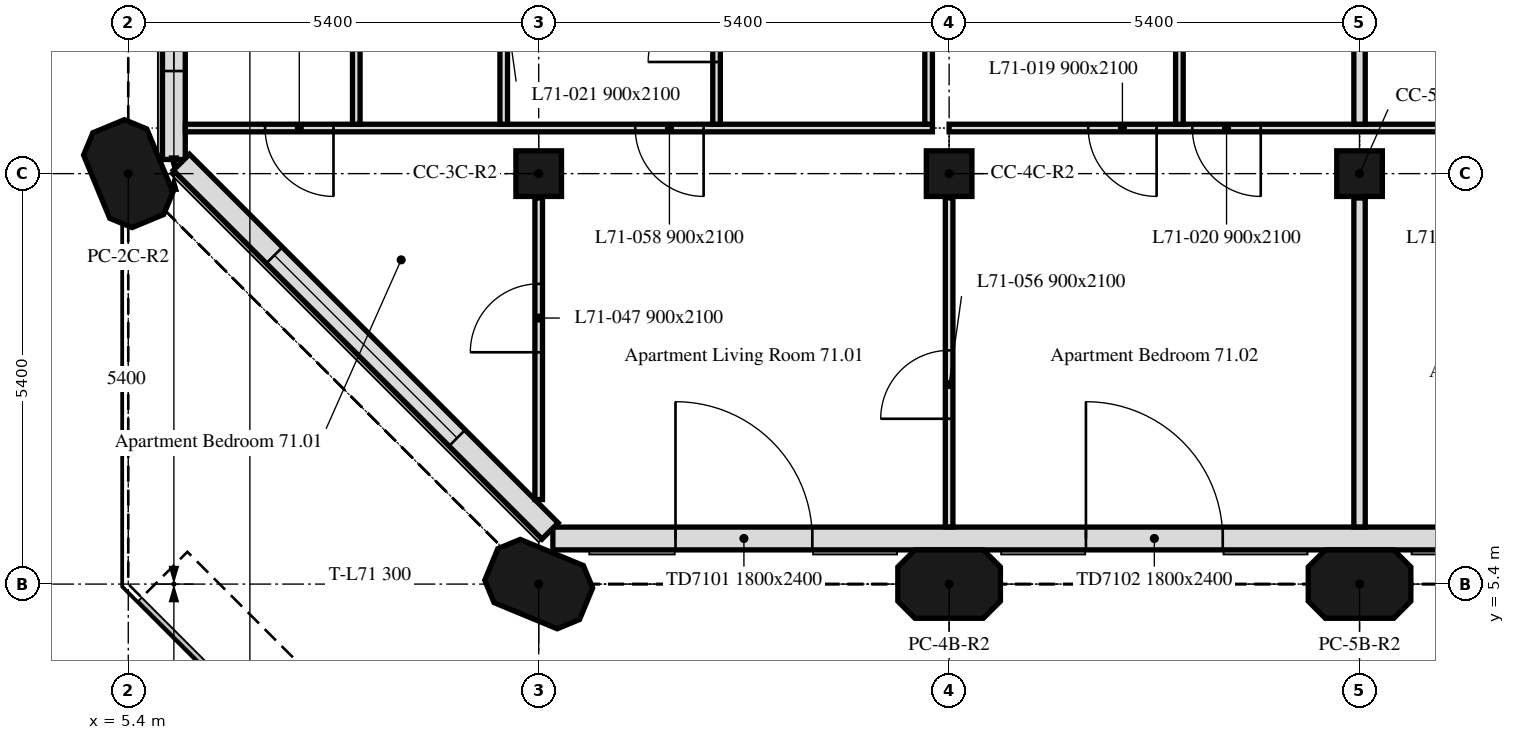
"""IFC4 building model, lengths in metres.
Left out: names, types, materials, properties, quantities, classifications, styles, units other than length and angle.
Written with IfcOpenShell. Run it as: python <this file> out.ifc"""

import sys

from ifc_helpers import new_model, si_unit, direction, frame, frame_2d, origin, origin_2d, place, context, subcontext, project, spatial, polyline, rectangle, outline, extrude, element, fill, save


model = new_model("IFC4")
c1 = context("Model", 3, precision=1e-05, world=origin(), true_north=direction((0.0, 1.0)))
c2 = subcontext(c1, "Body", "Model", "MODEL_VIEW")
j1 = project(units=[si_unit("LENGTHUNIT", "METRE"), si_unit("PLANEANGLEUNIT", "RADIAN")], contexts=[c1])
p1 = place(None, origin())
s1 = spatial("IfcSite", under=j1, at=p1, CompositionType="ELEMENT")
p2 = place(p1, origin())
s2 = spatial("IfcBuilding", under=s1, at=p2, CompositionType="ELEMENT")
p3 = place(p2, frame((0.0, 0.0, 288.4)))
s3 = spatial("IfcBuildingStorey", under=s2, at=p3, CompositionType="ELEMENT", Elevation=288.4)
for number, where, z_axis, x_axis in (
    (1, (10.8, 5.4, 0.0), (0.0, 0.0, 1.0), (-0.924, 0.383, 0.0)),
    (2, (16.2, 5.4, 0.0), (0.0, 0.0, 1.0), (1.0, 0.0, 0.0)),
    (3, (21.6, 5.4, 0.0), (0.0, 0.0, 1.0), (1.0, 0.0, 0.0)),
    (4, (5.4, 10.8, 0.0), (0.0, 0.0, 1.0), (-0.383, 0.924, 0.0)),
):
    element("IfcColumn", number, at=place(p3, frame(where, z_axis=z_axis, x_axis=x_axis)), inside=s3, PredefinedType="COLUMN", context=c2, shape_type="SweptSolid", body=[
        extrude(outline(polyline([(-0.45, -0.45), (0.45, -0.45), (0.675, -0.225), (0.675, 0.225), (0.45, 0.45), (-0.45, 0.45), (-0.675, 0.225), (-0.675, -0.225), (-0.45, -0.45)])), origin(), (0.0, 0.0, 1.0), 3.0),
    ])
for number, where, z_axis, x_axis in (
    (5, (10.8, 10.8, 0.0), (0.0, 0.0, 1.0), (1.0, 0.0, 0.0)),
    (6, (16.2, 10.8, 0.0), (0.0, 0.0, 1.0), (1.0, 0.0, 0.0)),
    (7, (21.6, 10.8, 0.0), (0.0, 0.0, 1.0), (1.0, 0.0, 0.0)),
):
    element("IfcColumn", number, at=place(p3, frame(where, z_axis=z_axis, x_axis=x_axis)), inside=s3, PredefinedType="COLUMN", context=c2, shape_type="SweptSolid", body=[
        extrude(rectangle(XDim=0.6, YDim=0.6, at=origin_2d()), origin(), (0.0, 0.0, 1.0), 3.0),
    ])
p4 = place(p3, frame((10.986, 6.0, 0.0), z_axis=(0.0, 0.0, 1.0), x_axis=(1.0, 0.0, 0.0)))
e8 = element("IfcWall", 8, at=p4, inside=s3, PredefinedType="SOLIDWALL", context=c2, shape_type="SweptSolid", body=[
    extrude(rectangle(XDim=32.027, YDim=0.3, at=frame_2d((16.014, 0.0))), origin(), (0.0, 0.0, 1.0), 3.0),
])
p5 = place(p4, frame((1.614, 0.0, 0.0)))
e9 = element("IfcOpeningElement", 9, at=p5, cuts=e8, PredefinedType="OPENING", context=c2, shape_type="SweptSolid", body=[
    extrude(rectangle(XDim=1.8, YDim=2.4, at=frame_2d((0.9, 1.2))), frame((0.0, 0.16, 0.0), z_axis=(0.0, -1.0, 0.0), x_axis=(1.0, 0.0, 0.0)), (0.0, 0.0, 1.0), 0.32),
])
p6 = place(p4, frame((7.014, 0.0, 0.0)))
e10 = element("IfcOpeningElement", 10, at=p6, cuts=e8, PredefinedType="OPENING", context=c2, shape_type="SweptSolid", body=[
    extrude(rectangle(XDim=1.8, YDim=2.4, at=frame_2d((0.9, 1.2))), frame((0.0, 0.16, 0.0), z_axis=(0.0, -1.0, 0.0), x_axis=(1.0, 0.0, 0.0)), (0.0, 0.0, 1.0), 0.32),
])
p7 = place(p4, frame((12.414, 0.0, 0.0)))
e11 = element("IfcOpeningElement", 11, at=p7, cuts=e8, PredefinedType="OPENING", context=c2, shape_type="SweptSolid", body=[
    extrude(rectangle(XDim=1.8, YDim=2.4, at=frame_2d((0.9, 1.2))), frame((0.0, 0.16, 0.0), z_axis=(0.0, -1.0, 0.0), x_axis=(1.0, 0.0, 0.0)), (0.0, 0.0, 1.0), 0.32),
])
p8 = place(p4, frame((17.814, 0.0, 0.0)))
e12 = element("IfcOpeningElement", 12, at=p8, cuts=e8, PredefinedType="OPENING", context=c2, shape_type="SweptSolid", body=[
    extrude(rectangle(XDim=1.8, YDim=2.4, at=frame_2d((0.9, 1.2))), frame((0.0, 0.16, 0.0), z_axis=(0.0, -1.0, 0.0), x_axis=(1.0, 0.0, 0.0)), (0.0, 0.0, 1.0), 0.32),
])
p9 = place(p4, frame((23.214, 0.0, 0.0)))
e13 = element("IfcOpeningElement", 13, at=p9, cuts=e8, PredefinedType="OPENING", context=c2, shape_type="SweptSolid", body=[
    extrude(rectangle(XDim=1.8, YDim=2.4, at=frame_2d((0.9, 1.2))), frame((0.0, 0.16, 0.0), z_axis=(0.0, -1.0, 0.0), x_axis=(1.0, 0.0, 0.0)), (0.0, 0.0, 1.0), 0.32),
])
p10 = place(p4, frame((28.614, 0.0, 0.0)))
e14 = element("IfcOpeningElement", 14, at=p10, cuts=e8, PredefinedType="OPENING", context=c2, shape_type="SweptSolid", body=[
    extrude(rectangle(XDim=1.8, YDim=2.4, at=frame_2d((0.9, 1.2))), frame((0.0, 0.16, 0.0), z_axis=(0.0, -1.0, 0.0), x_axis=(1.0, 0.0, 0.0)), (0.0, 0.0, 1.0), 0.32),
])
p11 = place(p3, frame((6.0, 16.2, 0.0), z_axis=(0.0, 0.0, 1.0), x_axis=(0.0, -1.0, 0.0)))
e15 = element("IfcWall", 15, at=p11, inside=s3, PredefinedType="SOLIDWALL", context=c2, shape_type="SweptSolid", body=[
    extrude(rectangle(XDim=5.214, YDim=0.3, at=frame_2d((2.607, 0.0))), origin(), (0.0, 0.0, 1.0), 3.0),
])
p12 = place(p11, frame((1.0, 0.0, 0.9)))
e16 = element("IfcOpeningElement", 16, at=p12, cuts=e15, PredefinedType="OPENING", context=c2, shape_type="SweptSolid", body=[
    extrude(rectangle(XDim=1.1, YDim=1.7, at=frame_2d((0.55, 0.85))), frame((0.0, 0.16, 0.0), z_axis=(0.0, -1.0, 0.0), x_axis=(1.0, 0.0, 0.0)), (0.0, 0.0, 1.0), 0.32),
])
p13 = place(p11, frame((2.95, 0.0, 0.9)))
e17 = element("IfcOpeningElement", 17, at=p13, cuts=e15, PredefinedType="OPENING", context=c2, shape_type="SweptSolid", body=[
    extrude(rectangle(XDim=1.1, YDim=1.7, at=frame_2d((0.55, 0.85))), frame((0.0, 0.16, 0.0), z_axis=(0.0, -1.0, 0.0), x_axis=(1.0, 0.0, 0.0)), (0.0, 0.0, 1.0), 0.32),
])
p14 = place(p3, frame((6.099, 10.949, 0.0), z_axis=(0.0, 0.0, 1.0), x_axis=(0.707106781187, -0.707106781187, 0.0)))
e18 = element("IfcWall", 18, at=p14, inside=s3, PredefinedType="SOLIDWALL", context=c2, shape_type="SweptSolid", body=[
    extrude(rectangle(XDim=6.86, YDim=0.3, at=frame_2d((3.43, 0.0))), origin(), (0.0, 0.0, 1.0), 3.0),
])
p15 = place(p14, frame((1.73, 0.0, 0.9)))
e19 = element("IfcOpeningElement", 19, at=p15, cuts=e18, PredefinedType="OPENING", context=c2, shape_type="SweptSolid", body=[
    extrude(rectangle(XDim=3.4, YDim=1.7, at=frame_2d((1.7, 0.85))), frame((0.0, 0.16, 0.0), z_axis=(0.0, -1.0, 0.0), x_axis=(1.0, 0.0, 0.0)), (0.0, 0.0, 1.0), 0.32),
])
p16 = place(p3, frame((15.98, 11.4, 0.0), z_axis=(0.0, 0.0, 1.0), x_axis=(-1.0, 0.0, 0.0)))
e20 = element("IfcWall", 20, at=p16, inside=s3, PredefinedType="PARTITIONING", context=c2, shape_type="SweptSolid", body=[
    extrude(rectangle(XDim=9.829, YDim=0.1, at=frame_2d((4.915, 0.0))), origin(), (0.0, 0.0, 1.0), 3.0),
])
p17 = place(p16, frame((7.88, 0.0, 0.0)))
e21 = element("IfcOpeningElement", 21, at=p17, cuts=e20, PredefinedType="OPENING", context=c2, shape_type="SweptSolid", body=[
    extrude(rectangle(XDim=0.9, YDim=2.1, at=frame_2d((0.45, 1.05))), frame((0.0, 0.05, 0.0), z_axis=(0.0, -1.0, 0.0), x_axis=(1.0, 0.0, 0.0)), (0.0, 0.0, 1.0), 0.1),
])
p18 = place(p16, frame((3.01, 0.0, 0.0)))
e22 = element("IfcOpeningElement", 22, at=p18, cuts=e20, PredefinedType="OPENING", context=c2, shape_type="SweptSolid", body=[
    extrude(rectangle(XDim=0.9, YDim=2.1, at=frame_2d((0.45, 1.05))), frame((0.0, 0.05, 0.0), z_axis=(0.0, -1.0, 0.0), x_axis=(1.0, 0.0, 0.0)), (0.0, 0.0, 1.0), 0.1),
])
p19 = place(p3, frame((10.8, 6.512, 0.0), z_axis=(0.0, 0.0, 1.0), x_axis=(0.0, 1.0, 0.0)))
e23 = element("IfcWall", 23, at=p19, inside=s3, PredefinedType="PARTITIONING", context=c2, shape_type="SweptSolid", body=[
    extrude(rectangle(XDim=3.968, YDim=0.1, at=frame_2d((1.984, 0.0))), origin(), (0.0, 0.0, 1.0), 3.0),
])
p20 = place(p19, frame((1.938, 0.0, 0.0)))
e24 = element("IfcOpeningElement", 24, at=p20, cuts=e23, PredefinedType="OPENING", context=c2, shape_type="SweptSolid", body=[
    extrude(rectangle(XDim=0.9, YDim=2.1, at=frame_2d((0.45, 1.05))), frame((0.0, 0.05, 0.0), z_axis=(0.0, -1.0, 0.0), x_axis=(1.0, 0.0, 0.0)), (0.0, 0.0, 1.0), 0.1),
])
p21 = place(p3, frame((16.2, 6.151, 0.0), z_axis=(0.0, 0.0, 1.0), x_axis=(0.0, 1.0, 0.0)))
e25 = element("IfcWall", 25, at=p21, inside=s3, PredefinedType="PARTITIONING", context=c2, shape_type="SweptSolid", body=[
    extrude(rectangle(XDim=4.329, YDim=0.1, at=frame_2d((2.165, 0.0))), origin(), (0.0, 0.0, 1.0), 3.0),
])
p22 = place(p21, frame((1.424, 0.0, 0.0)))
e26 = element("IfcOpeningElement", 26, at=p22, cuts=e25, PredefinedType="OPENING", context=c2, shape_type="SweptSolid", body=[
    extrude(rectangle(XDim=0.9, YDim=2.1, at=frame_2d((0.45, 1.05))), frame((0.0, 0.05, 0.0), z_axis=(0.0, -1.0, 0.0), x_axis=(1.0, 0.0, 0.0)), (0.0, 0.0, 1.0), 0.1),
])
p23 = place(p3, frame((37.8, 11.4, 0.0), z_axis=(0.0, 0.0, 1.0), x_axis=(-1.0, 0.0, 0.0)))
e27 = element("IfcWall", 27, at=p23, inside=s3, PredefinedType="PARTITIONING", context=c2, shape_type="SweptSolid", body=[
    extrude(rectangle(XDim=21.6, YDim=0.1, at=frame_2d((10.8, 0.0))), origin(), (0.0, 0.0, 1.0), 3.0),
])
p24 = place(p23, frame((18.87, 0.0, 0.0)))
e28 = element("IfcOpeningElement", 28, at=p24, cuts=e27, PredefinedType="OPENING", context=c2, shape_type="SweptSolid", body=[
    extrude(rectangle(XDim=0.9, YDim=2.1, at=frame_2d((0.45, 1.05))), frame((0.0, 0.05, 0.0), z_axis=(0.0, -1.0, 0.0), x_axis=(1.0, 0.0, 0.0)), (0.0, 0.0, 1.0), 0.1),
])
p25 = place(p23, frame((17.5, 0.0, 0.0)))
e29 = element("IfcOpeningElement", 29, at=p25, cuts=e27, PredefinedType="OPENING", context=c2, shape_type="SweptSolid", body=[
    extrude(rectangle(XDim=0.9, YDim=2.1, at=frame_2d((0.45, 1.05))), frame((0.0, 0.05, 0.0), z_axis=(0.0, -1.0, 0.0), x_axis=(1.0, 0.0, 0.0)), (0.0, 0.0, 1.0), 0.1),
])
p26 = place(p23, frame((6.917, 0.0, 0.0)))
e30 = element("IfcOpeningElement", 30, at=p26, cuts=e27, PredefinedType="OPENING", context=c2, shape_type="SweptSolid", body=[
    extrude(rectangle(XDim=0.9, YDim=2.1, at=frame_2d((0.45, 1.05))), frame((0.0, 0.05, 0.0), z_axis=(0.0, -1.0, 0.0), x_axis=(1.0, 0.0, 0.0)), (0.0, 0.0, 1.0), 0.1),
])
p27 = place(p23, frame((3.15, 0.0, 0.0)))
e31 = element("IfcOpeningElement", 31, at=p27, cuts=e27, PredefinedType="OPENING", context=c2, shape_type="SweptSolid", body=[
    extrude(rectangle(XDim=0.9, YDim=2.1, at=frame_2d((0.45, 1.05))), frame((0.0, 0.05, 0.0), z_axis=(0.0, -1.0, 0.0), x_axis=(1.0, 0.0, 0.0)), (0.0, 0.0, 1.0), 0.1),
])
p28 = place(p23, frame((14.158, 0.0, 0.0)))
e32 = element("IfcOpeningElement", 32, at=p28, cuts=e27, PredefinedType="OPENING", context=c2, shape_type="SweptSolid", body=[
    extrude(rectangle(XDim=0.9, YDim=2.1, at=frame_2d((0.45, 1.05))), frame((0.0, 0.05, 0.0), z_axis=(0.0, -1.0, 0.0), x_axis=(1.0, 0.0, 0.0)), (0.0, 0.0, 1.0), 0.1),
])
p29 = place(p23, frame((12.788, 0.0, 0.0)))
e33 = element("IfcOpeningElement", 33, at=p29, cuts=e27, PredefinedType="OPENING", context=c2, shape_type="SweptSolid", body=[
    extrude(rectangle(XDim=0.9, YDim=2.1, at=frame_2d((0.45, 1.05))), frame((0.0, 0.05, 0.0), z_axis=(0.0, -1.0, 0.0), x_axis=(1.0, 0.0, 0.0)), (0.0, 0.0, 1.0), 0.1),
])
p30 = place(p3, frame((21.6, 6.151, 0.0), z_axis=(0.0, 0.0, 1.0), x_axis=(0.0, 1.0, 0.0)))
e34 = element("IfcWall", 34, at=p30, inside=s3, PredefinedType="PARTITIONING", context=c2, shape_type="SweptSolid", body=[
    extrude(rectangle(XDim=4.329, YDim=0.15, at=frame_2d((2.165, 0.0))), origin(), (0.0, 0.0, 1.0), 3.0),
])
p31 = place(p3, frame((8.4, 11.45, 0.0), z_axis=(0.0, 0.0, 1.0), x_axis=(0.0, 1.0, 0.0)))
e35 = element("IfcWall", 35, at=p31, inside=s3, PredefinedType="PARTITIONING", context=c2, shape_type="SweptSolid", body=[
    extrude(rectangle(XDim=2.425, YDim=0.1, at=frame_2d((1.212, 0.0))), origin(), (0.0, 0.0, 1.0), 3.0),
])
p32 = place(p3, frame((10.34, 11.45, 0.0), z_axis=(0.0, 0.0, 1.0), x_axis=(0.0, 1.0, 0.0)))
e36 = element("IfcWall", 36, at=p32, inside=s3, PredefinedType="PARTITIONING", context=c2, shape_type="SweptSolid", body=[
    extrude(rectangle(XDim=2.425, YDim=0.1, at=frame_2d((1.212, 0.0))), origin(), (0.0, 0.0, 1.0), 3.0),
])
p33 = place(p32, frame((1.275, 0.0, 0.0)))
e37 = element("IfcOpeningElement", 37, at=p33, cuts=e36, PredefinedType="OPENING", context=c2, shape_type="SweptSolid", body=[
    extrude(rectangle(XDim=0.9, YDim=2.1, at=frame_2d((0.45, 1.05))), frame((0.0, 0.05, 0.0), z_axis=(0.0, -1.0, 0.0), x_axis=(1.0, 0.0, 0.0)), (0.0, 0.0, 1.0), 0.1),
])
p34 = place(p3, frame((13.14, 11.45, 0.0), z_axis=(0.0, 0.0, 1.0), x_axis=(0.0, 1.0, 0.0)))
e38 = element("IfcWall", 38, at=p34, inside=s3, PredefinedType="PARTITIONING", context=c2, shape_type="SweptSolid", body=[
    extrude(rectangle(XDim=2.425, YDim=0.1, at=frame_2d((1.212, 0.0))), origin(), (0.0, 0.0, 1.0), 3.0),
])
p35 = place(p34, frame((0.819, 0.0, 0.0)))
e39 = element("IfcOpeningElement", 39, at=p35, cuts=e38, PredefinedType="OPENING", context=c2, shape_type="SweptSolid", body=[
    extrude(rectangle(XDim=0.9, YDim=2.1, at=frame_2d((0.45, 1.05))), frame((0.0, 0.05, 0.0), z_axis=(0.0, -1.0, 0.0), x_axis=(1.0, 0.0, 0.0)), (0.0, 0.0, 1.0), 0.1),
])
for number, where, z_axis, x_axis in (
    (40, (15.93, 11.45, 0.0), (0.0, 0.0, 1.0), (0.0, 1.0, 0.0)),
    (41, (19.23, 11.45, 0.0), (0.0, 0.0, 1.0), (0.0, 1.0, 0.0)),
):
    element("IfcWall", number, at=place(p3, frame(where, z_axis=z_axis, x_axis=x_axis)), inside=s3, PredefinedType="PARTITIONING", context=c2, shape_type="SweptSolid", body=[
        extrude(rectangle(XDim=2.425, YDim=0.1, at=frame_2d((1.212, 0.0))), origin(), (0.0, 0.0, 1.0), 3.0),
    ])
p36 = place(p3, frame((21.6, 11.45, 0.0), z_axis=(0.0, 0.0, 1.0), x_axis=(0.0, 1.0, 0.0)))
e42 = element("IfcWall", 42, at=p36, inside=s3, PredefinedType="PARTITIONING", context=c2, shape_type="SweptSolid", body=[
    extrude(rectangle(XDim=2.425, YDim=0.15, at=frame_2d((1.212, 0.0))), origin(), (0.0, 0.0, 1.0), 3.0),
])
p37 = place(p5, origin())
e43 = element("IfcDoor", 43, at=p37, inside=s3, OperationType="DOUBLE_DOOR_DOUBLE_SWING", PredefinedType="DOOR", context=c2, shape_type="SweptSolid", body=[
    extrude(rectangle(XDim=1.8, YDim=2.4, at=frame_2d((0.9, 1.2))), frame((0.0, 0.025, 0.0), z_axis=(0.0, -1.0, 0.0), x_axis=(1.0, 0.0, 0.0)), (0.0, 0.0, 1.0), 0.05),
])
fill(e9, e43)
p38 = place(p6, origin())
e44 = element("IfcDoor", 44, at=p38, inside=s3, OperationType="DOUBLE_DOOR_DOUBLE_SWING", PredefinedType="DOOR", context=c2, shape_type="SweptSolid", body=[
    extrude(rectangle(XDim=1.8, YDim=2.4, at=frame_2d((0.9, 1.2))), frame((0.0, 0.025, 0.0), z_axis=(0.0, -1.0, 0.0), x_axis=(1.0, 0.0, 0.0)), (0.0, 0.0, 1.0), 0.05),
])
fill(e10, e44)
p39 = place(p13, origin())
e45 = element("IfcWindow", 45, at=p39, inside=s3, PartitioningType="SINGLE_PANEL", PredefinedType="WINDOW", context=c2, shape_type="SweptSolid", body=[
    extrude(rectangle(XDim=1.1, YDim=1.7, at=frame_2d((0.55, 0.85))), frame((0.0, 0.03, 0.0), z_axis=(0.0, -1.0, 0.0), x_axis=(1.0, 0.0, 0.0)), (0.0, 0.0, 1.0), 0.06),
])
fill(e17, e45)
p40 = place(p15, origin())
e46 = element("IfcWindow", 46, at=p40, inside=s3, PartitioningType="SINGLE_PANEL", PredefinedType="WINDOW", context=c2, shape_type="SweptSolid", body=[
    extrude(rectangle(XDim=3.4, YDim=1.7, at=frame_2d((1.7, 0.85))), frame((0.0, 0.03, 0.0), z_axis=(0.0, -1.0, 0.0), x_axis=(1.0, 0.0, 0.0)), (0.0, 0.0, 1.0), 0.06),
])
fill(e19, e46)
p41 = place(p17, origin())
e47 = element("IfcDoor", 47, at=p41, inside=s3, OperationType="SINGLE_SWING_RIGHT", PredefinedType="DOOR", context=c2, shape_type="SweptSolid", body=[
    extrude(rectangle(XDim=0.9, YDim=2.1, at=frame_2d((0.45, 1.05))), frame((0.0, 0.025, 0.0), z_axis=(0.0, -1.0, 0.0), x_axis=(1.0, 0.0, 0.0)), (0.0, 0.0, 1.0), 0.05),
])
fill(e21, e47)
p42 = place(p24, origin())
e48 = element("IfcDoor", 48, at=p42, inside=s3, OperationType="SINGLE_SWING_LEFT", PredefinedType="DOOR", context=c2, shape_type="SweptSolid", body=[
    extrude(rectangle(XDim=0.9, YDim=2.1, at=frame_2d((0.45, 1.05))), frame((0.0, 0.025, 0.0), z_axis=(0.0, -1.0, 0.0), x_axis=(1.0, 0.0, 0.0)), (0.0, 0.0, 1.0), 0.05),
])
fill(e28, e48)
p43 = place(p25, origin())
e49 = element("IfcDoor", 49, at=p43, inside=s3, OperationType="SINGLE_SWING_RIGHT", PredefinedType="DOOR", context=c2, shape_type="SweptSolid", body=[
    extrude(rectangle(XDim=0.9, YDim=2.1, at=frame_2d((0.45, 1.05))), frame((0.0, 0.025, 0.0), z_axis=(0.0, -1.0, 0.0), x_axis=(1.0, 0.0, 0.0)), (0.0, 0.0, 1.0), 0.05),
])
fill(e29, e49)
p44 = place(p35, origin())
e50 = element("IfcDoor", 50, at=p44, inside=s3, OperationType="SINGLE_SWING_LEFT", PredefinedType="DOOR", context=c2, shape_type="SweptSolid", body=[
    extrude(rectangle(XDim=0.9, YDim=2.1, at=frame_2d((0.45, 1.05))), frame((0.0, 0.025, 0.0), z_axis=(0.0, -1.0, 0.0), x_axis=(1.0, 0.0, 0.0)), (0.0, 0.0, 1.0), 0.05),
])
fill(e39, e50)
p45 = place(p20, origin())
e51 = element("IfcDoor", 51, at=p45, inside=s3, OperationType="SINGLE_SWING_RIGHT", PredefinedType="DOOR", context=c2, shape_type="SweptSolid", body=[
    extrude(rectangle(XDim=0.9, YDim=2.1, at=frame_2d((0.45, 1.05))), frame((0.0, 0.025, 0.0), z_axis=(0.0, -1.0, 0.0), x_axis=(1.0, 0.0, 0.0)), (0.0, 0.0, 1.0), 0.05),
])
fill(e24, e51)
p46 = place(p22, origin())
e52 = element("IfcDoor", 52, at=p46, inside=s3, OperationType="SINGLE_SWING_LEFT", PredefinedType="DOOR", context=c2, shape_type="SweptSolid", body=[
    extrude(rectangle(XDim=0.9, YDim=2.1, at=frame_2d((0.45, 1.05))), frame((0.0, 0.025, 0.0), z_axis=(0.0, -1.0, 0.0), x_axis=(1.0, 0.0, 0.0)), (0.0, 0.0, 1.0), 0.05),
])
fill(e26, e52)
p47 = place(p18, origin())
e53 = element("IfcDoor", 53, at=p47, inside=s3, OperationType="SINGLE_SWING_RIGHT", PredefinedType="DOOR", context=c2, shape_type="SweptSolid", body=[
    extrude(rectangle(XDim=0.9, YDim=2.1, at=frame_2d((0.45, 1.05))), frame((0.0, 0.025, 0.0), z_axis=(0.0, -1.0, 0.0), x_axis=(1.0, 0.0, 0.0)), (0.0, 0.0, 1.0), 0.05),
])
fill(e22, e53)
save(model, sys.argv[1])
